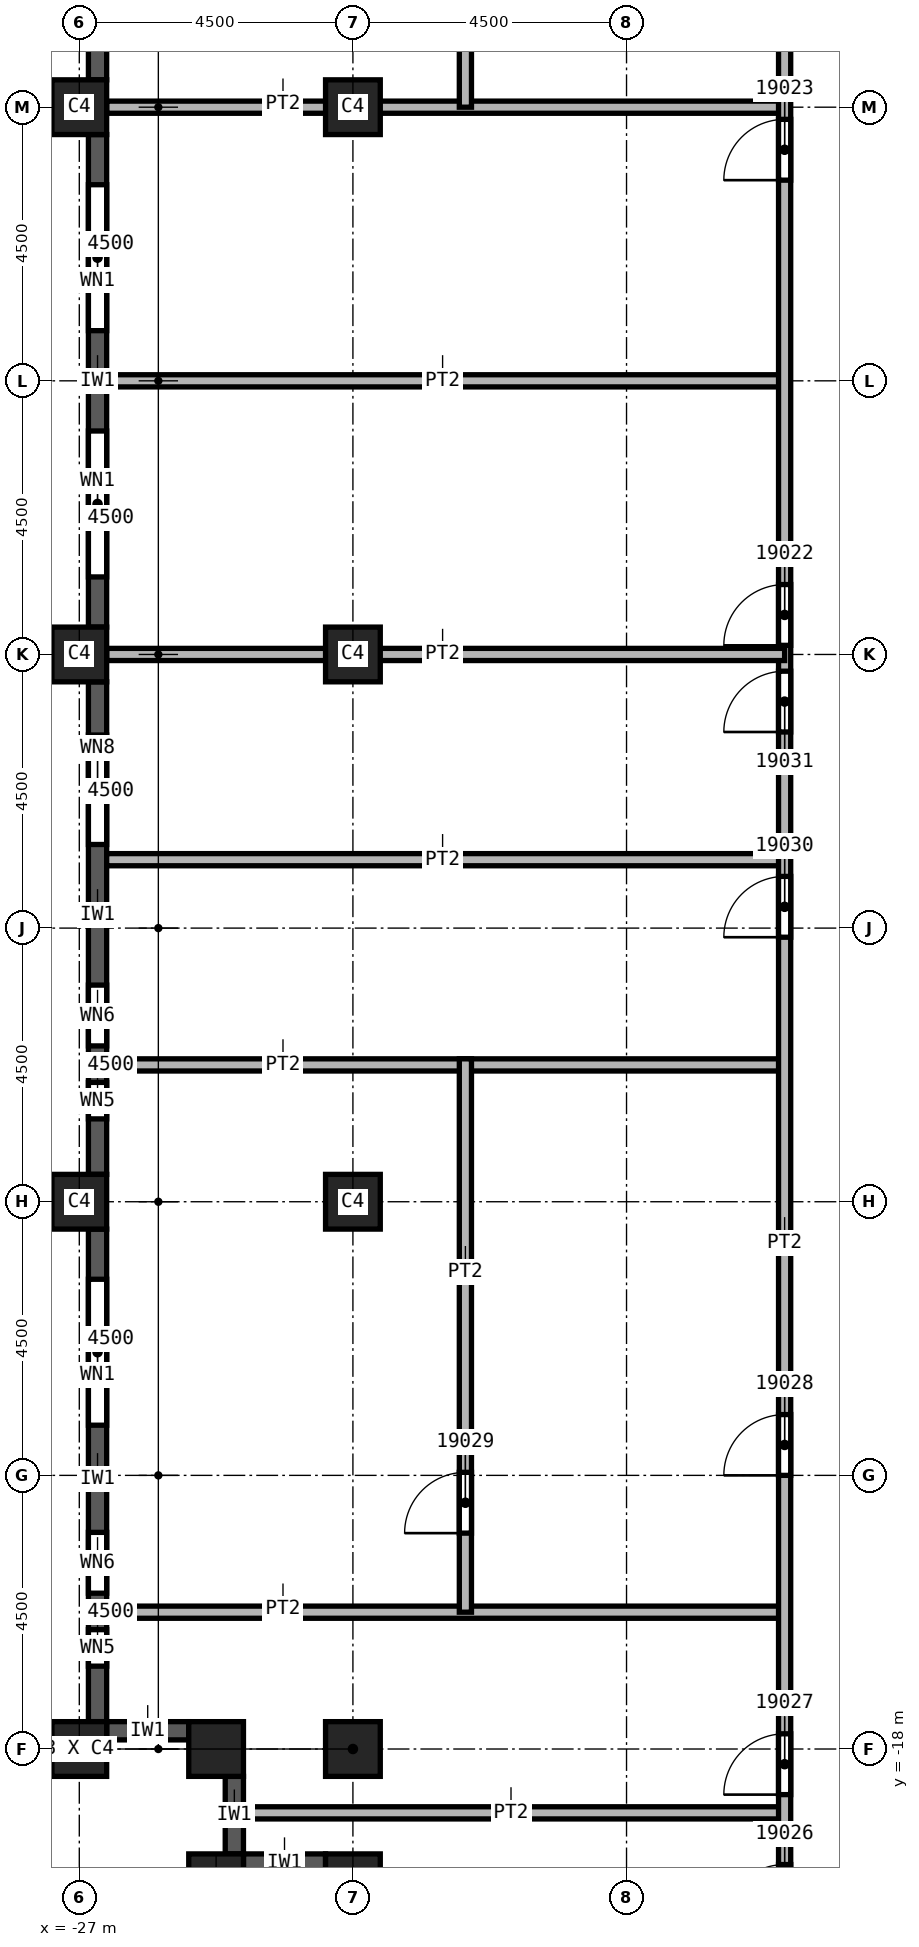
"""IFC4 building model, lengths in metres.
Left out: names, types, materials, properties, quantities, classifications, styles, units other than length and angle.
Written with IfcOpenShell. Run it as: python <this file> out.ifc"""

import sys

from ifc_helpers import new_model, si_unit, direction, frame, frame_2d, origin, origin_2d, place, context, subcontext, project, spatial, rectangle, extrude, element, fill, save


model = new_model("IFC4")
c1 = context("Model", 3, precision=1e-05, world=origin(), true_north=direction((0.0, 1.0)))
c2 = subcontext(c1, "Body", "Model", "MODEL_VIEW")
j1 = project(units=[si_unit("LENGTHUNIT", "METRE"), si_unit("PLANEANGLEUNIT", "RADIAN")], contexts=[c1])
p1 = place(None, origin())
s1 = spatial("IfcSite", under=j1, at=p1, CompositionType="ELEMENT")
p2 = place(p1, origin())
s2 = spatial("IfcBuilding", under=s1, at=p2, CompositionType="ELEMENT")
p3 = place(p2, frame((0.0, 0.0, 278.0)))
s3 = spatial("IfcBuildingStorey", under=s2, at=p3, CompositionType="ELEMENT", Elevation=278.0)
for number, where, z_axis, x_axis in (
    (1, (-22.5, 0.0, 0.0), (0.0, 0.0, 1.0), (1.0, 0.0, 0.0)),
    (2, (-22.5, 9.0, 0.0), (0.0, 0.0, 1.0), (1.0, 0.0, 0.0)),
    (3, (-22.5, -9.0, 0.0), (0.0, 0.0, 1.0), (1.0, 0.0, 0.0)),
    (4, (-22.5, -18.0, 0.0), (0.0, 0.0, 1.0), (1.0, 0.0, 0.0)),
    (5, (-27.0, 0.0, 0.0), (0.0, 0.0, 1.0), (0.0, 1.0, 0.0)),
    (6, (-27.0, 9.0, 0.0), (0.0, 0.0, 1.0), (0.0, 1.0, 0.0)),
    (7, (-27.0, -9.0, 0.0), (0.0, 0.0, 1.0), (0.0, 1.0, 0.0)),
    (8, (-27.0, -18.0, 0.0), (0.0, 0.0, 1.0), (0.0, 1.0, 0.0)),
    (9, (-22.5, -20.175, 0.0), (0.0, 0.0, 1.0), (1.0, 0.0, 0.0)),
    (10, (-24.75, -20.175, 0.0), (0.0, 0.0, 1.0), (1.0, 0.0, 0.0)),
    (11, (-24.75, -18.0, 0.0), (0.0, 0.0, 1.0), (1.0, 0.0, 0.0)),
):
    element("IfcColumn", number, at=place(p3, frame(where, z_axis=z_axis, x_axis=x_axis)), inside=s3, PredefinedType="COLUMN", context=c2, shape_type="SweptSolid", body=[
        extrude(rectangle(XDim=0.9, YDim=0.9, at=origin_2d()), origin(), (0.0, 0.0, 1.0), 3.72),
    ])
p4 = place(p3, frame((-26.7, 17.55, 0.0), z_axis=(0.0, 0.0, 1.0), x_axis=(0.0, -1.0, 0.0)))
e12 = element("IfcWall", 12, at=p4, inside=s3, PredefinedType="SOLIDWALL", context=c2, shape_type="SweptSolid", body=[
    extrude(rectangle(XDim=8.1, YDim=0.3, at=frame_2d((4.05, 0.0))), origin(), (0.0, 0.0, 1.0), 3.12),
])
p5 = place(p4, frame((0.825, 0.0, 0.8)))
e13 = element("IfcOpeningElement", 13, at=p5, cuts=e12, PredefinedType="OPENING", context=c2, shape_type="SweptSolid", body=[
    extrude(rectangle(XDim=2.4, YDim=1.95, at=frame_2d((1.2, 0.975))), frame((0.0, 0.15, 0.0), z_axis=(0.0, -1.0, 0.0), x_axis=(1.0, 0.0, 0.0)), (0.0, 0.0, 1.0), 0.3),
])
p6 = place(p4, frame((4.875, 0.0, 0.8)))
e14 = element("IfcOpeningElement", 14, at=p6, cuts=e12, PredefinedType="OPENING", context=c2, shape_type="SweptSolid", body=[
    extrude(rectangle(XDim=2.4, YDim=1.95, at=frame_2d((1.2, 0.975))), frame((0.0, 0.15, 0.0), z_axis=(0.0, -1.0, 0.0), x_axis=(1.0, 0.0, 0.0)), (0.0, 0.0, 1.0), 0.3),
])
p7 = place(p3, frame((-26.7, 8.55, 0.0), z_axis=(0.0, 0.0, 1.0), x_axis=(0.0, -1.0, 0.0)))
e15 = element("IfcWall", 15, at=p7, inside=s3, PredefinedType="SOLIDWALL", context=c2, shape_type="SweptSolid", body=[
    extrude(rectangle(XDim=8.1, YDim=0.3, at=frame_2d((4.05, 0.0))), origin(), (0.0, 0.0, 1.0), 3.12),
])
p8 = place(p7, frame((0.825, 0.0, 0.8)))
e16 = element("IfcOpeningElement", 16, at=p8, cuts=e15, PredefinedType="OPENING", context=c2, shape_type="SweptSolid", body=[
    extrude(rectangle(XDim=2.4, YDim=1.95, at=frame_2d((1.2, 0.975))), frame((0.0, 0.15, 0.0), z_axis=(0.0, -1.0, 0.0), x_axis=(1.0, 0.0, 0.0)), (0.0, 0.0, 1.0), 0.3),
])
p9 = place(p7, frame((4.875, 0.0, 0.8)))
e17 = element("IfcOpeningElement", 17, at=p9, cuts=e15, PredefinedType="OPENING", context=c2, shape_type="SweptSolid", body=[
    extrude(rectangle(XDim=2.4, YDim=1.95, at=frame_2d((1.2, 0.975))), frame((0.0, 0.15, 0.0), z_axis=(0.0, -1.0, 0.0), x_axis=(1.0, 0.0, 0.0)), (0.0, 0.0, 1.0), 0.3),
])
p10 = place(p3, frame((-26.7, -0.45, 0.0), z_axis=(0.0, 0.0, 1.0), x_axis=(0.0, -1.0, 0.0)))
e18 = element("IfcWall", 18, at=p10, inside=s3, PredefinedType="SOLIDWALL", context=c2, shape_type="SweptSolid", body=[
    extrude(rectangle(XDim=8.1, YDim=0.3, at=frame_2d((4.05, 0.0))), origin(), (0.0, 0.0, 1.0), 3.12),
])
p11 = place(p10, frame((0.875, 0.0, 0.8)))
e19 = element("IfcOpeningElement", 19, at=p11, cuts=e18, PredefinedType="OPENING", context=c2, shape_type="SweptSolid", body=[
    extrude(rectangle(XDim=1.8, YDim=1.95, at=frame_2d((0.9, 0.975))), frame((0.0, 0.15, 0.0), z_axis=(0.0, -1.0, 0.0), x_axis=(1.0, 0.0, 0.0)), (0.0, 0.0, 1.0), 0.3),
])
p12 = place(p10, frame((4.988, 0.0, 0.8)))
e20 = element("IfcOpeningElement", 20, at=p12, cuts=e18, PredefinedType="OPENING", context=c2, shape_type="SweptSolid", body=[
    extrude(rectangle(XDim=1.0, YDim=1.95, at=frame_2d((0.5, 0.975))), frame((0.0, 0.15, 0.0), z_axis=(0.0, -1.0, 0.0), x_axis=(1.0, 0.0, 0.0)), (0.0, 0.0, 1.0), 0.3),
])
p13 = place(p10, frame((6.587, 0.0, 0.8)))
e21 = element("IfcOpeningElement", 21, at=p13, cuts=e18, PredefinedType="OPENING", context=c2, shape_type="SweptSolid", body=[
    extrude(rectangle(XDim=0.6, YDim=1.95, at=frame_2d((0.3, 0.975))), frame((0.0, 0.15, 0.0), z_axis=(0.0, -1.0, 0.0), x_axis=(1.0, 0.0, 0.0)), (0.0, 0.0, 1.0), 0.3),
])
p14 = place(p3, frame((-26.7, -9.45, 0.0), z_axis=(0.0, 0.0, 1.0), x_axis=(0.0, -1.0, 0.0)))
e22 = element("IfcWall", 22, at=p14, inside=s3, PredefinedType="SOLIDWALL", context=c2, shape_type="SweptSolid", body=[
    extrude(rectangle(XDim=8.1, YDim=0.3, at=frame_2d((4.05, 0.0))), origin(), (0.0, 0.0, 1.0), 3.12),
])
p15 = place(p14, frame((0.825, 0.0, 0.8)))
e23 = element("IfcOpeningElement", 23, at=p15, cuts=e22, PredefinedType="OPENING", context=c2, shape_type="SweptSolid", body=[
    extrude(rectangle(XDim=2.4, YDim=1.95, at=frame_2d((1.2, 0.975))), frame((0.0, 0.15, 0.0), z_axis=(0.0, -1.0, 0.0), x_axis=(1.0, 0.0, 0.0)), (0.0, 0.0, 1.0), 0.3),
])
p16 = place(p14, frame((4.988, 0.0, 0.8)))
e24 = element("IfcOpeningElement", 24, at=p16, cuts=e22, PredefinedType="OPENING", context=c2, shape_type="SweptSolid", body=[
    extrude(rectangle(XDim=1.0, YDim=1.95, at=frame_2d((0.5, 0.975))), frame((0.0, 0.15, 0.0), z_axis=(0.0, -1.0, 0.0), x_axis=(1.0, 0.0, 0.0)), (0.0, 0.0, 1.0), 0.3),
])
p17 = place(p14, frame((6.587, 0.0, 0.8)))
e25 = element("IfcOpeningElement", 25, at=p17, cuts=e22, PredefinedType="OPENING", context=c2, shape_type="SweptSolid", body=[
    extrude(rectangle(XDim=0.6, YDim=1.95, at=frame_2d((0.3, 0.975))), frame((0.0, 0.15, 0.0), z_axis=(0.0, -1.0, 0.0), x_axis=(1.0, 0.0, 0.0)), (0.0, 0.0, 1.0), 0.3),
])
p18 = place(p3, frame((-26.55, -17.7, 0.0), z_axis=(0.0, 0.0, 1.0), x_axis=(1.0, 0.0, 0.0)))
e26 = element("IfcWall", 26, at=p18, inside=s3, PredefinedType="SOLIDWALL", context=c2, shape_type="SweptSolid", body=[
    extrude(rectangle(XDim=1.35, YDim=0.3, at=frame_2d((0.675, 0.0))), origin(), (0.0, 0.0, 1.0), 3.12),
])
p19 = place(p3, frame((-24.45, -18.45, 0.0), z_axis=(0.0, 0.0, 1.0), x_axis=(0.0, -1.0, 0.0)))
e27 = element("IfcWall", 27, at=p19, inside=s3, PredefinedType="SOLIDWALL", context=c2, shape_type="SweptSolid", body=[
    extrude(rectangle(XDim=1.275, YDim=0.3, at=frame_2d((0.638, 0.0))), origin(), (0.0, 0.0, 1.0), 3.12),
])
p20 = place(p3, frame((-24.3, -19.875, 0.0), z_axis=(0.0, 0.0, 1.0), x_axis=(1.0, 0.0, 0.0)))
e28 = element("IfcWall", 28, at=p20, inside=s3, PredefinedType="SOLIDWALL", context=c2, shape_type="SweptSolid", body=[
    extrude(rectangle(XDim=1.35, YDim=0.3, at=frame_2d((0.675, 0.0))), origin(), (0.0, 0.0, 1.0), 3.12),
])
for number, where, z_axis, x_axis in (
    (29, (-26.55, -15.75, 0.0), (0.0, 0.0, 1.0), (1.0, 0.0, 0.0)),
    (30, (-26.55, -6.75, 0.0), (0.0, 0.0, 1.0), (1.0, 0.0, 0.0)),
    (31, (-26.55, -3.375, 0.0), (0.0, 0.0, 1.0), (1.0, 0.0, 0.0)),
    (32, (-26.55, 4.5, 0.0), (0.0, 0.0, 1.0), (1.0, 0.0, 0.0)),
    (33, (-26.55, 9.0, 0.0), (0.0, 0.0, 1.0), (1.0, 0.0, 0.0)),
):
    element("IfcWall", number, at=place(p3, frame(where, z_axis=z_axis, x_axis=x_axis)), inside=s3, PredefinedType="PARTITIONING", context=c2, shape_type="SweptSolid", body=[
        extrude(rectangle(XDim=11.15, YDim=0.2, at=frame_2d((5.575, 0.0))), origin(), (0.0, 0.0, 1.0), 3.72),
    ])
p21 = place(p3, frame((-24.3, -19.05, 0.0), z_axis=(0.0, 0.0, 1.0), x_axis=(1.0, 0.0, 0.0)))
e34 = element("IfcWall", 34, at=p21, inside=s3, PredefinedType="PARTITIONING", context=c2, shape_type="SweptSolid", body=[
    extrude(rectangle(XDim=8.9, YDim=0.2, at=frame_2d((4.45, 0.0))), origin(), (0.0, 0.0, 1.0), 3.72),
])
p22 = place(p3, frame((-20.65, -15.75, 0.0), z_axis=(0.0, 0.0, 1.0), x_axis=(0.0, 1.0, 0.0)))
e35 = element("IfcWall", 35, at=p22, inside=s3, PredefinedType="PARTITIONING", context=c2, shape_type="SweptSolid", body=[
    extrude(rectangle(XDim=9.1, YDim=0.2, at=frame_2d((4.55, 0.0))), origin(), (0.0, 0.0, 1.0), 3.72),
])
p23 = place(p22, frame((1.3, 0.0, 0.0)))
e36 = element("IfcOpeningElement", 36, at=p23, cuts=e35, PredefinedType="OPENING", context=c2, shape_type="SweptSolid", body=[
    extrude(rectangle(XDim=1.0, YDim=2.1, at=frame_2d((0.5, 1.05))), frame((0.0, 0.1, 0.0), z_axis=(0.0, -1.0, 0.0), x_axis=(1.0, 0.0, 0.0)), (0.0, 0.0, 1.0), 0.2),
])
p24 = place(p3, frame((-20.65, 9.0, 0.0), z_axis=(0.0, 0.0, 1.0), x_axis=(0.0, 1.0, 0.0)))
e37 = element("IfcWall", 37, at=p24, inside=s3, PredefinedType="PARTITIONING", context=c2, shape_type="SweptSolid", body=[
    extrude(rectangle(XDim=4.5, YDim=0.2, at=frame_2d((2.25, 0.0))), origin(), (0.0, 0.0, 1.0), 3.72),
])
p25 = place(p24, frame((2.65, 0.0, 0.0)))
e38 = element("IfcOpeningElement", 38, at=p25, cuts=e37, PredefinedType="OPENING", context=c2, shape_type="SweptSolid", body=[
    extrude(rectangle(XDim=1.0, YDim=2.1, at=frame_2d((0.5, 1.05))), frame((0.0, 0.1, 0.0), z_axis=(0.0, -1.0, 0.0), x_axis=(1.0, 0.0, 0.0)), (0.0, 0.0, 1.0), 0.2),
])
p26 = place(p3, frame((-15.4, -21.9, 0.0), z_axis=(0.0, 0.0, 1.0), x_axis=(0.0, 1.0, 0.0)))
e39 = element("IfcWall", 39, at=p26, inside=s3, PredefinedType="PARTITIONING", context=c2, shape_type="SweptSolid", body=[
    extrude(rectangle(XDim=35.5, YDim=0.2, at=frame_2d((17.75, 0.0))), origin(), (0.0, 0.0, 1.0), 3.72),
])
p27 = place(p26, frame((22.05, 0.0, 0.0)))
e40 = element("IfcOpeningElement", 40, at=p27, cuts=e39, PredefinedType="OPENING", context=c2, shape_type="SweptSolid", body=[
    extrude(rectangle(XDim=1.0, YDim=2.1, at=frame_2d((0.5, 1.05))), frame((0.0, 0.1, 0.0), z_axis=(0.0, -1.0, 0.0), x_axis=(1.0, 0.0, 0.0)), (0.0, 0.0, 1.0), 0.2),
])
p28 = place(p26, frame((29.7, 0.0, 0.0)))
e41 = element("IfcOpeningElement", 41, at=p28, cuts=e39, PredefinedType="OPENING", context=c2, shape_type="SweptSolid", body=[
    extrude(rectangle(XDim=1.0, YDim=2.1, at=frame_2d((0.5, 1.05))), frame((0.0, 0.1, 0.0), z_axis=(0.0, -1.0, 0.0), x_axis=(1.0, 0.0, 0.0)), (0.0, 0.0, 1.0), 0.2),
])
p29 = place(p26, frame((1.0, 0.0, 0.0)))
e42 = element("IfcOpeningElement", 42, at=p29, cuts=e39, PredefinedType="OPENING", context=c2, shape_type="SweptSolid", body=[
    extrude(rectangle(XDim=1.0, YDim=2.1, at=frame_2d((0.5, 1.05))), frame((0.0, 0.1, 0.0), z_axis=(0.0, -1.0, 0.0), x_axis=(1.0, 0.0, 0.0)), (0.0, 0.0, 1.0), 0.2),
])
p30 = place(p26, frame((3.15, 0.0, 0.0)))
e43 = element("IfcOpeningElement", 43, at=p30, cuts=e39, PredefinedType="OPENING", context=c2, shape_type="SweptSolid", body=[
    extrude(rectangle(XDim=1.0, YDim=2.1, at=frame_2d((0.5, 1.05))), frame((0.0, 0.1, 0.0), z_axis=(0.0, -1.0, 0.0), x_axis=(1.0, 0.0, 0.0)), (0.0, 0.0, 1.0), 0.2),
])
p31 = place(p26, frame((8.4, 0.0, 0.0)))
e44 = element("IfcOpeningElement", 44, at=p31, cuts=e39, PredefinedType="OPENING", context=c2, shape_type="SweptSolid", body=[
    extrude(rectangle(XDim=1.0, YDim=2.1, at=frame_2d((0.5, 1.05))), frame((0.0, 0.1, 0.0), z_axis=(0.0, -1.0, 0.0), x_axis=(1.0, 0.0, 0.0)), (0.0, 0.0, 1.0), 0.2),
])
p32 = place(p26, frame((17.25, 0.0, 0.0)))
e45 = element("IfcOpeningElement", 45, at=p32, cuts=e39, PredefinedType="OPENING", context=c2, shape_type="SweptSolid", body=[
    extrude(rectangle(XDim=1.0, YDim=2.1, at=frame_2d((0.5, 1.05))), frame((0.0, 0.1, 0.0), z_axis=(0.0, -1.0, 0.0), x_axis=(1.0, 0.0, 0.0)), (0.0, 0.0, 1.0), 0.2),
])
p33 = place(p26, frame((20.625, 0.0, 0.0)))
e46 = element("IfcOpeningElement", 46, at=p33, cuts=e39, PredefinedType="OPENING", context=c2, shape_type="SweptSolid", body=[
    extrude(rectangle(XDim=1.0, YDim=2.1, at=frame_2d((0.5, 1.05))), frame((0.0, 0.1, 0.0), z_axis=(0.0, -1.0, 0.0), x_axis=(1.0, 0.0, 0.0)), (0.0, 0.0, 1.0), 0.2),
])
p34 = place(p3, frame((-15.4, 0.0, 0.0), z_axis=(0.0, 0.0, 1.0), x_axis=(-1.0, 0.0, 0.0)))
e47 = element("IfcWall", 47, at=p34, inside=s3, PredefinedType="PARTITIONING", context=c2, shape_type="SweptSolid", body=[
    extrude(rectangle(XDim=11.15, YDim=0.2, at=frame_2d((5.575, 0.0))), origin(), (0.0, 0.0, 1.0), 3.72),
])
p35 = place(p8, origin())
e48 = element("IfcWindow", 48, at=p35, inside=s3, PartitioningType="SINGLE_PANEL", PredefinedType="WINDOW", context=c2, shape_type="SweptSolid", body=[
    extrude(rectangle(XDim=2.4, YDim=1.95, at=frame_2d((1.2, 0.975))), frame((0.0, 0.03, 0.0), z_axis=(0.0, -1.0, 0.0), x_axis=(1.0, 0.0, 0.0)), (0.0, 0.0, 1.0), 0.06),
])
fill(e16, e48)
p36 = place(p9, origin())
e49 = element("IfcWindow", 49, at=p36, inside=s3, PartitioningType="SINGLE_PANEL", PredefinedType="WINDOW", context=c2, shape_type="SweptSolid", body=[
    extrude(rectangle(XDim=2.4, YDim=1.95, at=frame_2d((1.2, 0.975))), frame((0.0, 0.03, 0.0), z_axis=(0.0, -1.0, 0.0), x_axis=(1.0, 0.0, 0.0)), (0.0, 0.0, 1.0), 0.06),
])
fill(e17, e49)
p37 = place(p15, origin())
e50 = element("IfcWindow", 50, at=p37, inside=s3, PartitioningType="SINGLE_PANEL", PredefinedType="WINDOW", context=c2, shape_type="SweptSolid", body=[
    extrude(rectangle(XDim=2.4, YDim=1.95, at=frame_2d((1.2, 0.975))), frame((0.0, 0.03, 0.0), z_axis=(0.0, -1.0, 0.0), x_axis=(1.0, 0.0, 0.0)), (0.0, 0.0, 1.0), 0.06),
])
fill(e23, e50)
p38 = place(p27, origin())
e51 = element("IfcDoor", 51, at=p38, inside=s3, OperationType="SINGLE_SWING_LEFT", PredefinedType="DOOR", context=c2, shape_type="SweptSolid", body=[
    extrude(rectangle(XDim=1.0, YDim=2.1, at=frame_2d((0.5, 1.05))), frame((0.0, 0.025, 0.0), z_axis=(0.0, -1.0, 0.0), x_axis=(1.0, 0.0, 0.0)), (0.0, 0.0, 1.0), 0.05),
])
fill(e40, e51)
p39 = place(p28, origin())
e52 = element("IfcDoor", 52, at=p39, inside=s3, OperationType="SINGLE_SWING_RIGHT", PredefinedType="DOOR", context=c2, shape_type="SweptSolid", body=[
    extrude(rectangle(XDim=1.0, YDim=2.1, at=frame_2d((0.5, 1.05))), frame((0.0, 0.025, 0.0), z_axis=(0.0, -1.0, 0.0), x_axis=(1.0, 0.0, 0.0)), (0.0, 0.0, 1.0), 0.05),
])
fill(e41, e52)
p40 = place(p29, origin())
e53 = element("IfcDoor", 53, at=p40, inside=s3, OperationType="SINGLE_SWING_LEFT", PredefinedType="DOOR", context=c2, shape_type="SweptSolid", body=[
    extrude(rectangle(XDim=1.0, YDim=2.1, at=frame_2d((0.5, 1.05))), frame((0.0, 0.025, 0.0), z_axis=(0.0, -1.0, 0.0), x_axis=(1.0, 0.0, 0.0)), (0.0, 0.0, 1.0), 0.05),
])
fill(e42, e53)
p41 = place(p30, origin())
e54 = element("IfcDoor", 54, at=p41, inside=s3, OperationType="SINGLE_SWING_RIGHT", PredefinedType="DOOR", context=c2, shape_type="SweptSolid", body=[
    extrude(rectangle(XDim=1.0, YDim=2.1, at=frame_2d((0.5, 1.05))), frame((0.0, 0.025, 0.0), z_axis=(0.0, -1.0, 0.0), x_axis=(1.0, 0.0, 0.0)), (0.0, 0.0, 1.0), 0.05),
])
fill(e43, e54)
p42 = place(p31, origin())
e55 = element("IfcDoor", 55, at=p42, inside=s3, OperationType="SINGLE_SWING_LEFT", PredefinedType="DOOR", context=c2, shape_type="SweptSolid", body=[
    extrude(rectangle(XDim=1.0, YDim=2.1, at=frame_2d((0.5, 1.05))), frame((0.0, 0.025, 0.0), z_axis=(0.0, -1.0, 0.0), x_axis=(1.0, 0.0, 0.0)), (0.0, 0.0, 1.0), 0.05),
])
fill(e44, e55)
p43 = place(p23, origin())
e56 = element("IfcDoor", 56, at=p43, inside=s3, OperationType="SINGLE_SWING_RIGHT", PredefinedType="DOOR", context=c2, shape_type="SweptSolid", body=[
    extrude(rectangle(XDim=1.0, YDim=2.1, at=frame_2d((0.5, 1.05))), frame((0.0, 0.025, 0.0), z_axis=(0.0, -1.0, 0.0), x_axis=(1.0, 0.0, 0.0)), (0.0, 0.0, 1.0), 0.05),
])
fill(e36, e56)
p44 = place(p32, origin())
e57 = element("IfcDoor", 57, at=p44, inside=s3, OperationType="SINGLE_SWING_LEFT", PredefinedType="DOOR", context=c2, shape_type="SweptSolid", body=[
    extrude(rectangle(XDim=1.0, YDim=2.1, at=frame_2d((0.5, 1.05))), frame((0.0, 0.025, 0.0), z_axis=(0.0, -1.0, 0.0), x_axis=(1.0, 0.0, 0.0)), (0.0, 0.0, 1.0), 0.05),
])
fill(e45, e57)
p45 = place(p33, origin())
e58 = element("IfcDoor", 58, at=p45, inside=s3, OperationType="SINGLE_SWING_RIGHT", PredefinedType="DOOR", context=c2, shape_type="SweptSolid", body=[
    extrude(rectangle(XDim=1.0, YDim=2.1, at=frame_2d((0.5, 1.05))), frame((0.0, 0.025, 0.0), z_axis=(0.0, -1.0, 0.0), x_axis=(1.0, 0.0, 0.0)), (0.0, 0.0, 1.0), 0.05),
])
fill(e46, e58)
p46 = place(p11, origin())
e59 = element("IfcWindow", 59, at=p46, inside=s3, PartitioningType="SINGLE_PANEL", PredefinedType="WINDOW", context=c2, shape_type="SweptSolid", body=[
    extrude(rectangle(XDim=1.8, YDim=1.95, at=frame_2d((0.9, 0.975))), frame((0.0, 0.03, 0.0), z_axis=(0.0, -1.0, 0.0), x_axis=(1.0, 0.0, 0.0)), (0.0, 0.0, 1.0), 0.06),
])
fill(e19, e59)
p47 = place(p12, origin())
e60 = element("IfcWindow", 60, at=p47, inside=s3, PartitioningType="SINGLE_PANEL", PredefinedType="WINDOW", context=c2, shape_type="SweptSolid", body=[
    extrude(rectangle(XDim=1.0, YDim=1.95, at=frame_2d((0.5, 0.975))), frame((0.0, 0.03, 0.0), z_axis=(0.0, -1.0, 0.0), x_axis=(1.0, 0.0, 0.0)), (0.0, 0.0, 1.0), 0.06),
])
fill(e20, e60)
p48 = place(p13, origin())
e61 = element("IfcWindow", 61, at=p48, inside=s3, PartitioningType="SINGLE_PANEL", PredefinedType="WINDOW", context=c2, shape_type="SweptSolid", body=[
    extrude(rectangle(XDim=0.6, YDim=1.95, at=frame_2d((0.3, 0.975))), frame((0.0, 0.03, 0.0), z_axis=(0.0, -1.0, 0.0), x_axis=(1.0, 0.0, 0.0)), (0.0, 0.0, 1.0), 0.06),
])
fill(e21, e61)
p49 = place(p16, origin())
e62 = element("IfcWindow", 62, at=p49, inside=s3, PartitioningType="SINGLE_PANEL", PredefinedType="WINDOW", context=c2, shape_type="SweptSolid", body=[
    extrude(rectangle(XDim=1.0, YDim=1.95, at=frame_2d((0.5, 0.975))), frame((0.0, 0.03, 0.0), z_axis=(0.0, -1.0, 0.0), x_axis=(1.0, 0.0, 0.0)), (0.0, 0.0, 1.0), 0.06),
])
fill(e24, e62)
p50 = place(p17, origin())
e63 = element("IfcWindow", 63, at=p50, inside=s3, PartitioningType="SINGLE_PANEL", PredefinedType="WINDOW", context=c2, shape_type="SweptSolid", body=[
    extrude(rectangle(XDim=0.6, YDim=1.95, at=frame_2d((0.3, 0.975))), frame((0.0, 0.03, 0.0), z_axis=(0.0, -1.0, 0.0), x_axis=(1.0, 0.0, 0.0)), (0.0, 0.0, 1.0), 0.06),
])
fill(e25, e63)
save(model, sys.argv[1])
